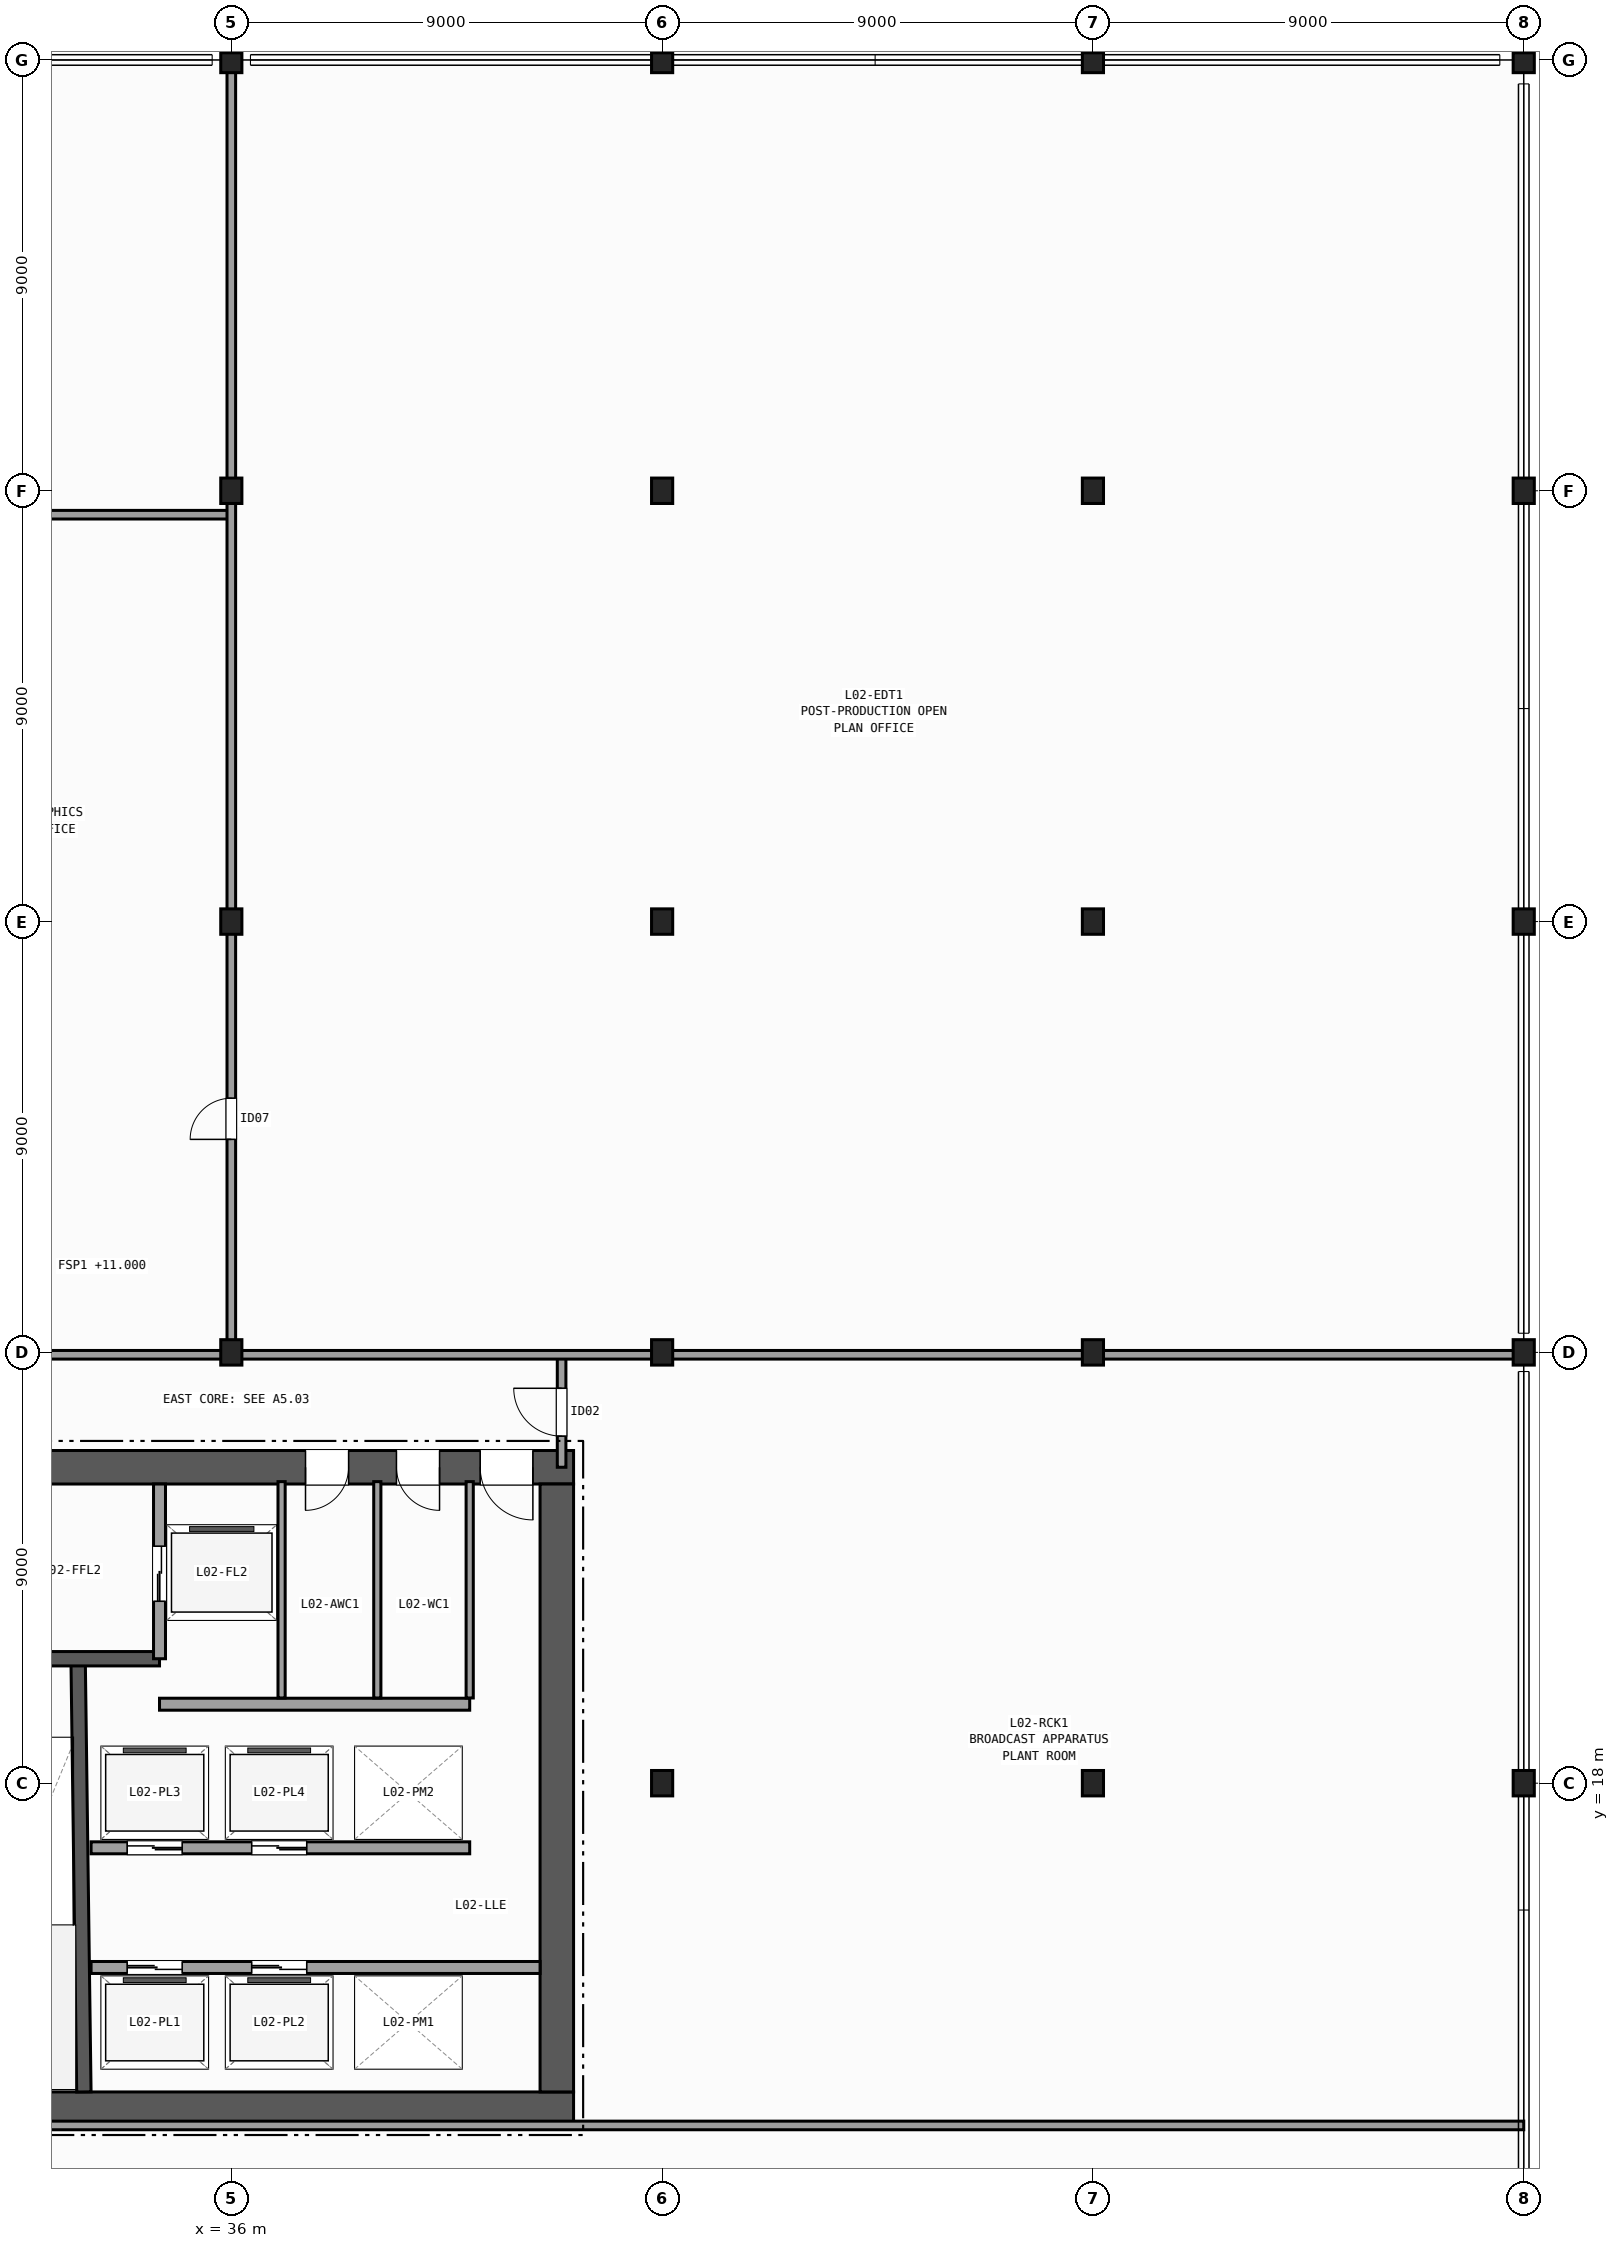
"""IFC4 building model, lengths in metres.
Left out: names, types, materials, properties, quantities, classifications, styles, units other than length and angle.
Written with IfcOpenShell. Run it as: python <this file> out.ifc"""

import sys

from ifc_helpers import new_model, si_unit, direction, frame, frame_2d, origin, origin_2d, place, context, subcontext, project, spatial, rectangle, i_section, extrude, element, fill, save


model = new_model("IFC4")
c1 = context("Model", 3, precision=1e-05, world=origin(), true_north=direction((0.0, 1.0)))
c2 = subcontext(c1, "Body", "Model", "MODEL_VIEW")
j1 = project(units=[si_unit("LENGTHUNIT", "METRE"), si_unit("PLANEANGLEUNIT", "RADIAN")], contexts=[c1])
p1 = place(None, origin())
s1 = spatial("IfcSite", under=j1, at=p1, CompositionType="ELEMENT")
p2 = place(p1, origin())
s2 = spatial("IfcBuilding", under=s1, at=p2, CompositionType="ELEMENT")
p3 = place(p2, frame((0.0, 0.0, 11.0)))
s3 = spatial("IfcBuildingStorey", under=s2, at=p3, CompositionType="ELEMENT", Elevation=11.0)
for number, where, z_axis, x_axis in (
    (1, (36.0, 27.0, 0.0), (0.0, 0.0, 1.0), (1.0, 0.0, 0.0)),
    (2, (36.0, 36.0, 0.0), (0.0, 0.0, 1.0), (1.0, 0.0, 0.0)),
    (3, (36.0, 45.0, 0.0), (0.0, 0.0, 1.0), (1.0, 0.0, 0.0)),
    (4, (36.0, 54.0, 0.0), (0.0, 0.0, 1.0), (1.0, 0.0, 0.0)),
    (5, (45.0, 18.0, 0.0), (0.0, 0.0, 1.0), (1.0, 0.0, 0.0)),
    (6, (45.0, 27.0, 0.0), (0.0, 0.0, 1.0), (1.0, 0.0, 0.0)),
    (7, (45.0, 36.0, 0.0), (0.0, 0.0, 1.0), (1.0, 0.0, 0.0)),
    (8, (45.0, 45.0, 0.0), (0.0, 0.0, 1.0), (1.0, 0.0, 0.0)),
    (9, (45.0, 54.0, 0.0), (0.0, 0.0, 1.0), (1.0, 0.0, 0.0)),
    (10, (54.0, 18.0, 0.0), (0.0, 0.0, 1.0), (1.0, 0.0, 0.0)),
    (11, (54.0, 27.0, 0.0), (0.0, 0.0, 1.0), (1.0, 0.0, 0.0)),
    (12, (54.0, 36.0, 0.0), (0.0, 0.0, 1.0), (1.0, 0.0, 0.0)),
    (13, (54.0, 45.0, 0.0), (0.0, 0.0, 1.0), (1.0, 0.0, 0.0)),
    (14, (54.0, 54.0, 0.0), (0.0, 0.0, 1.0), (1.0, 0.0, 0.0)),
    (15, (63.0, 18.0, 0.0), (0.0, 0.0, 1.0), (1.0, 0.0, 0.0)),
    (16, (63.0, 27.0, 0.0), (0.0, 0.0, 1.0), (1.0, 0.0, 0.0)),
    (17, (63.0, 36.0, 0.0), (0.0, 0.0, 1.0), (1.0, 0.0, 0.0)),
    (18, (63.0, 45.0, 0.0), (0.0, 0.0, 1.0), (1.0, 0.0, 0.0)),
    (19, (63.0, 54.0, 0.0), (0.0, 0.0, 1.0), (1.0, 0.0, 0.0)),
):
    element("IfcColumn", number, at=place(p3, frame(where, z_axis=z_axis, x_axis=x_axis)), inside=s3, PredefinedType="COLUMN", context=c2, shape_type="SweptSolid", body=[
        extrude(i_section(OverallWidth=0.442, OverallDepth=0.531, WebThickness=0.066, FlangeThickness=0.106, FilletRadius=0.015, at=origin_2d()), origin(), (0.0, 0.0, 1.0), 5.2),
    ])
p4 = place(p3, frame((29.05, 11.2, 0.0), z_axis=(0.0, 0.0, 1.0), x_axis=(1.0, 0.0, 0.0)))
e20 = element("IfcWall", 20, at=p4, inside=s3, PredefinedType="SHEAR", context=c2, shape_type="SweptSolid", body=[
    extrude(rectangle(XDim=14.1, YDim=0.7, at=frame_2d((7.05, 0.0))), origin(), (0.0, 0.0, 1.0), 4.88),
])
p5 = place(p3, frame((43.15, 24.6, 0.0), z_axis=(0.0, 0.0, 1.0), x_axis=(-1.0, 0.0, 0.0)))
e21 = element("IfcWall", 21, at=p5, inside=s3, PredefinedType="SHEAR", context=c2, shape_type="SweptSolid", body=[
    extrude(rectangle(XDim=14.1, YDim=0.7, at=frame_2d((7.05, 0.0))), origin(), (0.0, 0.0, 1.0), 4.88),
])
p6 = place(p5, frame((0.85, 0.0, 0.0)))
e22 = element("IfcOpeningElement", 22, at=p6, cuts=e21, PredefinedType="OPENING", context=c2, shape_type="SweptSolid", body=[
    extrude(rectangle(XDim=1.1, YDim=2.15, at=frame_2d((0.55, 1.075))), frame((0.0, 0.36, 0.0), z_axis=(0.0, -1.0, 0.0), x_axis=(1.0, 0.0, 0.0)), (0.0, 0.0, 1.0), 0.72),
])
p7 = place(p5, frame((2.8, 0.0, 0.0)))
e23 = element("IfcOpeningElement", 23, at=p7, cuts=e21, PredefinedType="OPENING", context=c2, shape_type="SweptSolid", body=[
    extrude(rectangle(XDim=0.9, YDim=2.1, at=frame_2d((0.45, 1.05))), frame((0.0, 0.36, 0.0), z_axis=(0.0, -1.0, 0.0), x_axis=(1.0, 0.0, 0.0)), (0.0, 0.0, 1.0), 0.72),
])
p8 = place(p5, frame((4.7, 0.0, 0.0)))
e24 = element("IfcOpeningElement", 24, at=p8, cuts=e21, PredefinedType="OPENING", context=c2, shape_type="SweptSolid", body=[
    extrude(rectangle(XDim=0.9, YDim=2.1, at=frame_2d((0.45, 1.05))), frame((0.0, 0.36, 0.0), z_axis=(0.0, -1.0, 0.0), x_axis=(1.0, 0.0, 0.0)), (0.0, 0.0, 1.0), 0.72),
])
p9 = place(p3, frame((42.8, 11.55, 0.0), z_axis=(0.0, 0.0, 1.0), x_axis=(0.0, 1.0, 0.0)))
e25 = element("IfcWall", 25, at=p9, inside=s3, PredefinedType="SHEAR", context=c2, shape_type="SweptSolid", body=[
    extrude(rectangle(XDim=12.7, YDim=0.7, at=frame_2d((6.35, 0.0))), origin(), (0.0, 0.0, 1.0), 4.88),
])
p10 = place(p3, frame((32.92, 11.55, 0.0), z_axis=(0.0, 0.0, 1.0), x_axis=(-0.01331804616, 0.99991131089, 0.0)))
e26 = element("IfcWall", 26, at=p10, inside=s3, PredefinedType="SHEAR", context=c2, shape_type="SweptSolid", body=[
    extrude(rectangle(XDim=9.001, YDim=0.3, at=frame_2d((4.5, 0.0))), origin(), (0.0, 0.0, 1.0), 4.88),
])
p11 = place(p3, frame((34.5, 20.6, 0.0), z_axis=(0.0, 0.0, 1.0), x_axis=(-1.0, 0.0, 0.0)))
e27 = element("IfcWall", 27, at=p11, inside=s3, PredefinedType="SHEAR", context=c2, shape_type="SweptSolid", body=[
    extrude(rectangle(XDim=4.75, YDim=0.3, at=frame_2d((2.375, 0.0))), origin(), (0.0, 0.0, 1.0), 4.88),
])
p12 = place(p11, frame((2.7, 0.0, 0.0)))
e28 = element("IfcOpeningElement", 28, at=p12, cuts=e27, PredefinedType="OPENING", context=c2, shape_type="SweptSolid", body=[
    extrude(rectangle(XDim=1.2, YDim=2.15, at=frame_2d((0.6, 1.075))), frame((0.0, 0.16, 0.0), z_axis=(0.0, -1.0, 0.0), x_axis=(1.0, 0.0, 0.0)), (0.0, 0.0, 1.0), 0.32),
])
p13 = place(p3, frame((34.5, 20.6, 0.0), z_axis=(0.0, 0.0, 1.0), x_axis=(0.0, 1.0, 0.0)))
e29 = element("IfcWall", 29, at=p13, inside=s3, PredefinedType="PARTITIONING", context=c2, shape_type="SweptSolid", body=[
    extrude(rectangle(XDim=3.65, YDim=0.25, at=frame_2d((1.825, 0.0))), origin(), (0.0, 0.0, 1.0), 4.88),
])
p14 = place(p13, frame((1.2, 0.0, 0.0)))
e30 = element("IfcOpeningElement", 30, at=p14, cuts=e29, PredefinedType="OPENING", context=c2, shape_type="SweptSolid", body=[
    extrude(rectangle(XDim=1.15, YDim=2.15, at=frame_2d((0.575, 1.075))), frame((0.0, 0.135, 0.0), z_axis=(0.0, -1.0, 0.0), x_axis=(1.0, 0.0, 0.0)), (0.0, 0.0, 1.0), 0.27),
])
p15 = place(p3, frame((34.5, 19.65, 0.0), z_axis=(0.0, 0.0, 1.0), x_axis=(1.0, 0.0, 0.0)))
e31 = element("IfcWall", 31, at=p15, inside=s3, PredefinedType="PARTITIONING", context=c2, shape_type="SweptSolid", body=[
    extrude(rectangle(XDim=6.48, YDim=0.25, at=frame_2d((3.24, 0.0))), origin(), (0.0, 0.0, 1.0), 4.88),
])
p16 = place(p3, frame((33.07, 14.15, 0.0), z_axis=(0.0, 0.0, 1.0), x_axis=(1.0, 0.0, 0.0)))
e32 = element("IfcWall", 32, at=p16, inside=s3, PredefinedType="PARTITIONING", context=c2, shape_type="SweptSolid", body=[
    extrude(rectangle(XDim=9.38, YDim=0.25, at=frame_2d((4.69, 0.0))), origin(), (0.0, 0.0, 1.0), 4.88),
])
p17 = place(p16, frame((0.755, 0.0, 0.0)))
e33 = element("IfcOpeningElement", 33, at=p17, cuts=e32, PredefinedType="OPENING", context=c2, shape_type="SweptSolid", body=[
    extrude(rectangle(XDim=1.15, YDim=2.15, at=frame_2d((0.575, 1.075))), frame((0.0, 0.135, 0.0), z_axis=(0.0, -1.0, 0.0), x_axis=(1.0, 0.0, 0.0)), (0.0, 0.0, 1.0), 0.27),
])
p18 = place(p16, frame((3.355, 0.0, 0.0)))
e34 = element("IfcOpeningElement", 34, at=p18, cuts=e32, PredefinedType="OPENING", context=c2, shape_type="SweptSolid", body=[
    extrude(rectangle(XDim=1.15, YDim=2.15, at=frame_2d((0.575, 1.075))), frame((0.0, 0.135, 0.0), z_axis=(0.0, -1.0, 0.0), x_axis=(1.0, 0.0, 0.0)), (0.0, 0.0, 1.0), 0.27),
])
p19 = place(p3, frame((40.98, 16.65, 0.0), z_axis=(0.0, 0.0, 1.0), x_axis=(-1.0, 0.0, 0.0)))
e35 = element("IfcWall", 35, at=p19, inside=s3, PredefinedType="PARTITIONING", context=c2, shape_type="SweptSolid", body=[
    extrude(rectangle(XDim=7.91, YDim=0.25, at=frame_2d((3.955, 0.0))), origin(), (0.0, 0.0, 1.0), 4.88),
])
p20 = place(p19, frame((6.005, 0.0, 0.0)))
e36 = element("IfcOpeningElement", 36, at=p20, cuts=e35, PredefinedType="OPENING", context=c2, shape_type="SweptSolid", body=[
    extrude(rectangle(XDim=1.15, YDim=2.15, at=frame_2d((0.575, 1.075))), frame((0.0, 0.135, 0.0), z_axis=(0.0, -1.0, 0.0), x_axis=(1.0, 0.0, 0.0)), (0.0, 0.0, 1.0), 0.27),
])
p21 = place(p19, frame((3.405, 0.0, 0.0)))
e37 = element("IfcOpeningElement", 37, at=p21, cuts=e35, PredefinedType="OPENING", context=c2, shape_type="SweptSolid", body=[
    extrude(rectangle(XDim=1.15, YDim=2.15, at=frame_2d((0.575, 1.075))), frame((0.0, 0.135, 0.0), z_axis=(0.0, -1.0, 0.0), x_axis=(1.0, 0.0, 0.0)), (0.0, 0.0, 1.0), 0.27),
])
for number, where, z_axis, x_axis in (
    (38, (37.05, 19.78, 0.0), (0.0, 0.0, 1.0), (0.0, 1.0, 0.0)),
    (39, (39.05, 19.78, 0.0), (0.0, 0.0, 1.0), (0.0, 1.0, 0.0)),
    (40, (40.98, 19.78, 0.0), (0.0, 0.0, 1.0), (0.0, 1.0, 0.0)),
):
    element("IfcWall", number, at=place(p3, frame(where, z_axis=z_axis, x_axis=x_axis)), inside=s3, PredefinedType="PARTITIONING", context=c2, shape_type="SweptSolid", body=[
        extrude(rectangle(XDim=4.52, YDim=0.15, at=frame_2d((2.26, 0.0))), origin(), (0.0, 0.0, 1.0), 4.88),
    ])
p22 = place(p3, frame((24.65, 10.85, 0.0), z_axis=(0.0, 0.0, 1.0), x_axis=(1.0, 0.0, 0.0)))
e41 = element("IfcWall", 41, at=p22, inside=s3, PredefinedType="PARTITIONING", context=c2, shape_type="SweptSolid", body=[
    extrude(rectangle(XDim=38.35, YDim=0.18, at=frame_2d((19.175, 0.0))), origin(), (0.0, 0.0, 1.0), 4.005),
])
p23 = place(p22, frame((2.0, 0.0, 0.0)))
e42 = element("IfcOpeningElement", 42, at=p23, cuts=e41, PredefinedType="OPENING", context=c2, shape_type="SweptSolid", body=[
    extrude(rectangle(XDim=1.2, YDim=2.15, at=frame_2d((0.6, 1.075))), frame((0.0, 0.1, 0.0), z_axis=(0.0, -1.0, 0.0), x_axis=(1.0, 0.0, 0.0)), (0.0, 0.0, 1.0), 0.2),
])
p24 = place(p3, frame((42.9, 24.6, 0.0), z_axis=(0.0, 0.0, 1.0), x_axis=(0.0, 1.0, 0.0)))
e43 = element("IfcWall", 43, at=p24, inside=s3, PredefinedType="PARTITIONING", context=c2, shape_type="SweptSolid", body=[
    extrude(rectangle(XDim=2.35, YDim=0.18, at=frame_2d((1.175, 0.0))), origin(), (0.0, 0.0, 1.0), 3.933),
])
p25 = place(p24, frame((0.65, 0.0, 0.0)))
e44 = element("IfcOpeningElement", 44, at=p25, cuts=e43, PredefinedType="OPENING", context=c2, shape_type="SweptSolid", body=[
    extrude(rectangle(XDim=1.0, YDim=2.1, at=frame_2d((0.5, 1.05))), frame((0.0, 0.1, 0.0), z_axis=(0.0, -1.0, 0.0), x_axis=(1.0, 0.0, 0.0)), (0.0, 0.0, 1.0), 0.2),
])
p26 = place(p3, frame((27.1, 26.95, 0.0), z_axis=(0.0, 0.0, 1.0), x_axis=(1.0, 0.0, 0.0)))
e45 = element("IfcWall", 45, at=p26, inside=s3, PredefinedType="PARTITIONING", context=c2, shape_type="SweptSolid", body=[
    extrude(rectangle(XDim=35.9, YDim=0.18, at=frame_2d((17.95, 0.0))), origin(), (0.0, 0.0, 1.0), 3.933),
])
p27 = place(p3, frame((11.1, 44.5, 0.0), z_axis=(0.0, 0.0, 1.0), x_axis=(1.0, 0.0, 0.0)))
e46 = element("IfcWall", 46, at=p27, inside=s3, PredefinedType="PARTITIONING", context=c2, shape_type="SweptSolid", body=[
    extrude(rectangle(XDim=24.9, YDim=0.18, at=frame_2d((12.45, 0.0))), origin(), (0.0, 0.0, 1.0), 4.005),
])
p28 = place(p27, frame((4.5, 0.0, 0.0)))
e47 = element("IfcOpeningElement", 47, at=p28, cuts=e46, PredefinedType="OPENING", context=c2, shape_type="SweptSolid", body=[
    extrude(rectangle(XDim=1.2, YDim=2.15, at=frame_2d((0.6, 1.075))), frame((0.0, 0.1, 0.0), z_axis=(0.0, -1.0, 0.0), x_axis=(1.0, 0.0, 0.0)), (0.0, 0.0, 1.0), 0.2),
])
p29 = place(p3, frame((36.0, 26.95, 0.0), z_axis=(0.0, 0.0, 1.0), x_axis=(0.0, 1.0, 0.0)))
e48 = element("IfcWall", 48, at=p29, inside=s3, PredefinedType="PARTITIONING", context=c2, shape_type="SweptSolid", body=[
    extrude(rectangle(XDim=27.05, YDim=0.18, at=frame_2d((13.525, 0.0))), origin(), (0.0, 0.0, 1.0), 3.933),
])
p30 = place(p29, frame((4.5, 0.0, 0.0)))
e49 = element("IfcOpeningElement", 49, at=p30, cuts=e48, PredefinedType="OPENING", context=c2, shape_type="SweptSolid", body=[
    extrude(rectangle(XDim=0.86, YDim=2.05, at=frame_2d((0.43, 1.025))), frame((0.0, 0.1, 0.0), z_axis=(0.0, -1.0, 0.0), x_axis=(1.0, 0.0, 0.0)), (0.0, 0.0, 1.0), 0.2),
])
p31 = place(p6, origin())
e50 = element("IfcDoor", 50, at=p31, inside=s3, OperationType="SINGLE_SWING_LEFT", PredefinedType="DOOR", context=c2, shape_type="SweptSolid", body=[
    extrude(rectangle(XDim=1.1, YDim=2.15, at=frame_2d((0.55, 1.075))), frame((0.0, 0.025, 0.0), z_axis=(0.0, -1.0, 0.0), x_axis=(1.0, 0.0, 0.0)), (0.0, 0.0, 1.0), 0.05),
])
fill(e22, e50)
p32 = place(p7, origin())
e51 = element("IfcDoor", 51, at=p32, inside=s3, OperationType="SINGLE_SWING_LEFT", PredefinedType="DOOR", context=c2, shape_type="SweptSolid", body=[
    extrude(rectangle(XDim=0.9, YDim=2.1, at=frame_2d((0.45, 1.05))), frame((0.0, 0.025, 0.0), z_axis=(0.0, -1.0, 0.0), x_axis=(1.0, 0.0, 0.0)), (0.0, 0.0, 1.0), 0.05),
])
fill(e23, e51)
p33 = place(p8, origin())
e52 = element("IfcDoor", 52, at=p33, inside=s3, OperationType="SINGLE_SWING_RIGHT", PredefinedType="DOOR", context=c2, shape_type="SweptSolid", body=[
    extrude(rectangle(XDim=0.9, YDim=2.1, at=frame_2d((0.45, 1.05))), frame((0.0, 0.025, 0.0), z_axis=(0.0, -1.0, 0.0), x_axis=(1.0, 0.0, 0.0)), (0.0, 0.0, 1.0), 0.05),
])
fill(e24, e52)
p34 = place(p14, origin())
e53 = element("IfcDoor", 53, at=p34, inside=s3, OperationType="DOUBLE_DOOR_SLIDING", PredefinedType="DOOR", context=c2, shape_type="SweptSolid", body=[
    extrude(rectangle(XDim=1.15, YDim=2.15, at=frame_2d((0.575, 1.075))), frame((0.0, 0.025, 0.0), z_axis=(0.0, -1.0, 0.0), x_axis=(1.0, 0.0, 0.0)), (0.0, 0.0, 1.0), 0.05),
])
fill(e30, e53)
p35 = place(p17, origin())
e54 = element("IfcDoor", 54, at=p35, inside=s3, OperationType="DOUBLE_DOOR_SLIDING", PredefinedType="DOOR", context=c2, shape_type="SweptSolid", body=[
    extrude(rectangle(XDim=1.15, YDim=2.15, at=frame_2d((0.575, 1.075))), frame((0.0, 0.025, 0.0), z_axis=(0.0, -1.0, 0.0), x_axis=(1.0, 0.0, 0.0)), (0.0, 0.0, 1.0), 0.05),
])
fill(e33, e54)
p36 = place(p18, origin())
e55 = element("IfcDoor", 55, at=p36, inside=s3, OperationType="DOUBLE_DOOR_SLIDING", PredefinedType="DOOR", context=c2, shape_type="SweptSolid", body=[
    extrude(rectangle(XDim=1.15, YDim=2.15, at=frame_2d((0.575, 1.075))), frame((0.0, 0.025, 0.0), z_axis=(0.0, -1.0, 0.0), x_axis=(1.0, 0.0, 0.0)), (0.0, 0.0, 1.0), 0.05),
])
fill(e34, e55)
p37 = place(p20, origin())
e56 = element("IfcDoor", 56, at=p37, inside=s3, OperationType="DOUBLE_DOOR_SLIDING", PredefinedType="DOOR", context=c2, shape_type="SweptSolid", body=[
    extrude(rectangle(XDim=1.15, YDim=2.15, at=frame_2d((0.575, 1.075))), frame((0.0, 0.025, 0.0), z_axis=(0.0, -1.0, 0.0), x_axis=(1.0, 0.0, 0.0)), (0.0, 0.0, 1.0), 0.05),
])
fill(e36, e56)
p38 = place(p21, origin())
e57 = element("IfcDoor", 57, at=p38, inside=s3, OperationType="DOUBLE_DOOR_SLIDING", PredefinedType="DOOR", context=c2, shape_type="SweptSolid", body=[
    extrude(rectangle(XDim=1.15, YDim=2.15, at=frame_2d((0.575, 1.075))), frame((0.0, 0.025, 0.0), z_axis=(0.0, -1.0, 0.0), x_axis=(1.0, 0.0, 0.0)), (0.0, 0.0, 1.0), 0.05),
])
fill(e37, e57)
p39 = place(p25, origin())
e58 = element("IfcDoor", 58, at=p39, inside=s3, OperationType="SINGLE_SWING_RIGHT", PredefinedType="DOOR", context=c2, shape_type="SweptSolid", body=[
    extrude(rectangle(XDim=1.0, YDim=2.1, at=frame_2d((0.5, 1.05))), frame((0.0, 0.025, 0.0), z_axis=(0.0, -1.0, 0.0), x_axis=(1.0, 0.0, 0.0)), (0.0, 0.0, 1.0), 0.05),
])
fill(e44, e58)
p40 = place(p30, origin())
e59 = element("IfcDoor", 59, at=p40, inside=s3, OperationType="SINGLE_SWING_LEFT", PredefinedType="DOOR", context=c2, shape_type="SweptSolid", body=[
    extrude(rectangle(XDim=0.86, YDim=2.05, at=frame_2d((0.43, 1.025))), frame((0.0, 0.025, 0.0), z_axis=(0.0, -1.0, 0.0), x_axis=(1.0, 0.0, 0.0)), (0.0, 0.0, 1.0), 0.05),
])
fill(e49, e59)
save(model, sys.argv[1])
